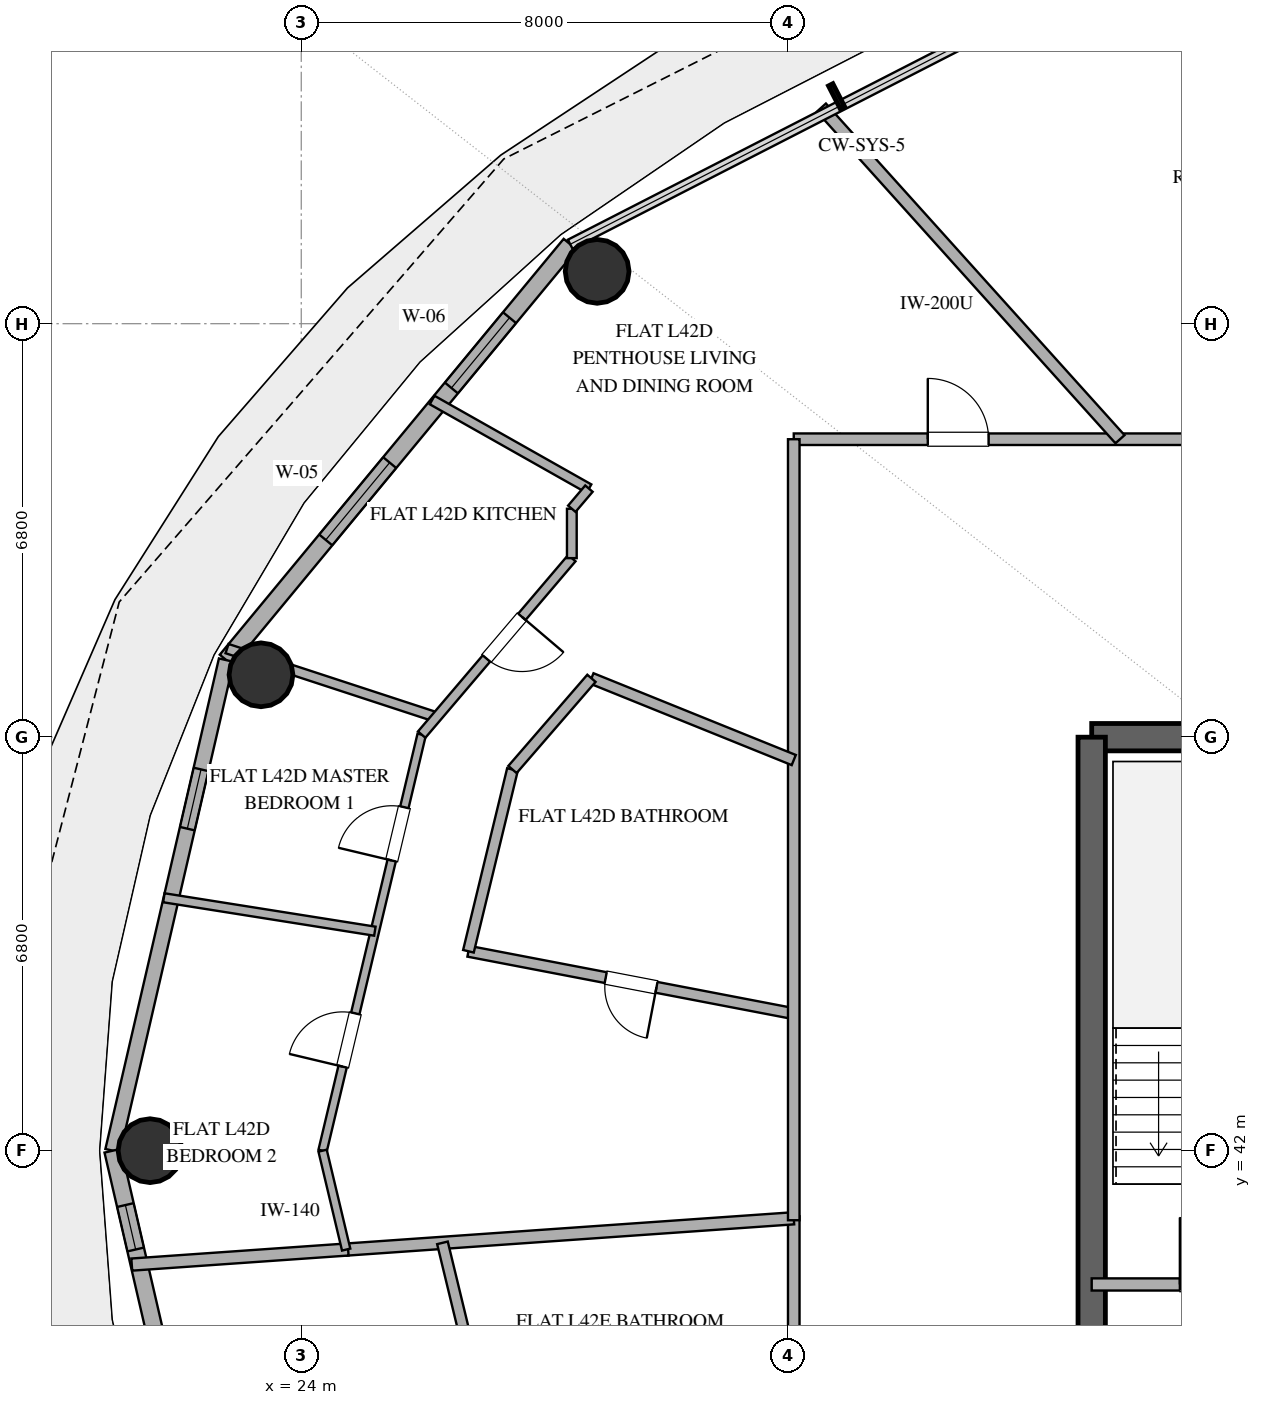
"""IFC4 building model, lengths in metres.
Left out: names, types, materials, properties, quantities, classifications, styles, units other than length and angle.
Written with IfcOpenShell. Run it as: python <this file> out.ifc"""

import sys

from ifc_helpers import new_model, si_unit, direction, frame, frame_2d, origin, origin_2d, place, context, subcontext, project, spatial, rectangle, hollow_circle, extrude, element, fill, save


model = new_model("IFC4")
c1 = context("Model", 3, precision=1e-05, world=origin(), true_north=direction((0.0, 1.0)))
c2 = subcontext(c1, "Body", "Model", "MODEL_VIEW")
j1 = project(units=[si_unit("LENGTHUNIT", "METRE"), si_unit("PLANEANGLEUNIT", "RADIAN")], contexts=[c1])
p1 = place(None, origin())
s1 = spatial("IfcSite", under=j1, at=p1, CompositionType="ELEMENT")
p2 = place(p1, origin())
s2 = spatial("IfcBuilding", under=s1, at=p2, CompositionType="ELEMENT")
p3 = place(p2, frame((0.0, 0.0, 168.6)))
s3 = spatial("IfcBuildingStorey", under=s2, at=p3, CompositionType="ELEMENT", Elevation=168.6)
p4 = place(p3, frame((37.0, 48.8, 0.0), z_axis=(0.0, 0.0, 1.0), x_axis=(1.0, 0.0, 0.0)))
e1 = element("IfcWall", 1, at=p4, inside=s3, PredefinedType="SHEAR", context=c2, shape_type="SweptSolid", body=[
    extrude(rectangle(XDim=4.0, YDim=0.45, at=frame_2d((2.0, 0.0))), origin(), (0.0, 0.0, 1.0), 3.38),
])
p5 = place(p3, frame((37.0, 35.2, 0.0), z_axis=(0.0, 0.0, 1.0), x_axis=(0.0, 1.0, 0.0)))
e2 = element("IfcWall", 2, at=p5, inside=s3, PredefinedType="SHEAR", context=c2, shape_type="SweptSolid", body=[
    extrude(rectangle(XDim=13.6, YDim=0.45, at=frame_2d((6.8, 0.0))), origin(), (0.0, 0.0, 1.0), 3.38),
])
for number, where, z_axis, x_axis in (
    (3, (28.866, 56.46, 0.0), (0.0, 0.0, 1.0), (1.0, 0.0, 0.0)),
    (4, (23.338, 49.826, 0.0), (0.0, 0.0, 1.0), (1.0, 0.0, 0.0)),
    (5, (21.513, 42.0, 0.0), (0.0, 0.0, 1.0), (1.0, 0.0, 0.0)),
):
    element("IfcColumn", number, at=place(p3, frame(where, z_axis=z_axis, x_axis=x_axis)), inside=s3, PredefinedType="COLUMN", context=c2, shape_type="SweptSolid", body=[
        extrude(hollow_circle(Radius=0.525, WallThickness=0.028, at=origin_2d()), origin(), (0.0, 0.0, 1.0), 3.38),
    ])
p6 = place(p3, frame((28.424, 56.906, 0.0), z_axis=(0.0, 0.0, 1.0), x_axis=(-0.637333477683, -0.770588111915, 0.0)))
e6 = element("IfcWall", 6, at=p6, inside=s3, PredefinedType="SOLIDWALL", context=c2, shape_type="SweptSolid", body=[
    extrude(rectangle(XDim=8.875, YDim=0.28, at=frame_2d((4.438, 0.0))), origin(), (0.0, 0.0, 1.0), 3.38),
])
p7 = place(p6, frame((1.566, 0.0, 0.85)))
e7 = element("IfcOpeningElement", 7, at=p7, cuts=e6, PredefinedType="OPENING", context=c2, shape_type="SweptSolid", body=[
    extrude(rectangle(XDim=1.5, YDim=2.0, at=frame_2d((0.75, 1.0))), frame((0.0, 0.15, 0.0), z_axis=(0.0, -1.0, 0.0), x_axis=(1.0, 0.0, 0.0)), (0.0, 0.0, 1.0), 0.3),
])
p8 = place(p6, frame((4.659, 0.0, 0.85)))
e8 = element("IfcOpeningElement", 8, at=p8, cuts=e6, PredefinedType="OPENING", context=c2, shape_type="SweptSolid", body=[
    extrude(rectangle(XDim=1.65, YDim=2.0, at=frame_2d((0.825, 1.0))), frame((0.0, 0.15, 0.0), z_axis=(0.0, -1.0, 0.0), x_axis=(1.0, 0.0, 0.0)), (0.0, 0.0, 1.0), 0.3),
])
p9 = place(p3, frame((22.768, 50.067, 0.0), z_axis=(0.0, 0.0, 1.0), x_axis=(-0.225473184558, -0.974249374157, 0.0)))
e9 = element("IfcWall", 9, at=p9, inside=s3, PredefinedType="SOLIDWALL", context=c2, shape_type="SweptSolid", body=[
    extrude(rectangle(XDim=8.28, YDim=0.25, at=frame_2d((4.14, 0.0))), origin(), (0.0, 0.0, 1.0), 3.38),
])
p10 = place(p9, frame((1.844, 0.0, 1.42)))
e10 = element("IfcOpeningElement", 10, at=p10, cuts=e9, PredefinedType="OPENING", context=c2, shape_type="SweptSolid", body=[
    extrude(rectangle(XDim=1.0, YDim=1.05, at=frame_2d((0.5, 0.525))), frame((0.0, 0.135, 0.0), z_axis=(0.0, -1.0, 0.0), x_axis=(1.0, 0.0, 0.0)), (0.0, 0.0, 1.0), 0.27),
])
p11 = place(p3, frame((20.901, 42.0, 0.0), z_axis=(0.0, 0.0, 1.0), x_axis=(0.225473184558, -0.974249374157, 0.0)))
e11 = element("IfcWall", 11, at=p11, inside=s3, PredefinedType="SOLIDWALL", context=c2, shape_type="SweptSolid", body=[
    extrude(rectangle(XDim=8.28, YDim=0.28, at=frame_2d((4.14, 0.0))), origin(), (0.0, 0.0, 1.0), 3.38),
])
p12 = place(p11, frame((5.144, 0.0, 0.0)))
e12 = element("IfcOpeningElement", 12, at=p12, cuts=e11, PredefinedType="OPENING", context=c2, shape_type="SweptSolid", body=[
    extrude(rectangle(XDim=1.6, YDim=2.25, at=frame_2d((0.8, 1.125))), frame((0.0, 0.15, 0.0), z_axis=(0.0, -1.0, 0.0), x_axis=(1.0, 0.0, 0.0)), (0.0, 0.0, 1.0), 0.3),
])
p13 = place(p11, frame((0.918, 0.0, 0.85)))
e13 = element("IfcOpeningElement", 13, at=p13, cuts=e11, PredefinedType="OPENING", context=c2, shape_type="SweptSolid", body=[
    extrude(rectangle(XDim=0.75, YDim=1.8, at=frame_2d((0.375, 0.9))), frame((0.0, 0.15, 0.0), z_axis=(0.0, -1.0, 0.0), x_axis=(1.0, 0.0, 0.0)), (0.0, 0.0, 1.0), 0.3),
])
p14 = place(p3, frame((37.0, 39.8, 0.0), z_axis=(0.0, 0.0, 1.0), x_axis=(1.0, 0.0, 0.0)))
e14 = element("IfcWall", 14, at=p14, inside=s3, PredefinedType="SOLIDWALL", context=c2, shape_type="SweptSolid", body=[
    extrude(rectangle(XDim=4.0, YDim=0.2, at=frame_2d((2.0, 0.0))), origin(), (0.0, 0.0, 1.0), 2.74),
])
p15 = place(p14, frame((1.45, 0.0, 0.0)))
e15 = element("IfcOpeningElement", 15, at=p15, cuts=e14, PredefinedType="OPENING", context=c2, shape_type="SweptSolid", body=[
    extrude(rectangle(XDim=1.1, YDim=2.15, at=frame_2d((0.55, 1.075))), frame((0.0, 0.11, 0.0), z_axis=(0.0, -1.0, 0.0), x_axis=(1.0, 0.0, 0.0)), (0.0, 0.0, 1.0), 0.22),
])
p16 = place(p3, frame((32.1, 53.7, 0.0), z_axis=(0.0, 0.0, 1.0), x_axis=(1.0, 0.0, 0.0)))
e16 = element("IfcWall", 16, at=p16, inside=s3, PredefinedType="PARTITIONING", context=c2, shape_type="SweptSolid", body=[
    extrude(rectangle(XDim=19.477, YDim=0.19, at=frame_2d((9.738, 0.0))), origin(), (0.0, 0.0, 1.0), 2.74),
])
p17 = place(p16, frame((9.923, 0.0, 0.0)))
e17 = element("IfcOpeningElement", 17, at=p17, cuts=e16, PredefinedType="OPENING", context=c2, shape_type="SweptSolid", body=[
    extrude(rectangle(XDim=1.0, YDim=2.2, at=frame_2d((0.5, 1.1))), frame((0.0, 0.105, 0.0), z_axis=(0.0, -1.0, 0.0), x_axis=(1.0, 0.0, 0.0)), (0.0, 0.0, 1.0), 0.21),
])
p18 = place(p16, frame((2.204, 0.0, 0.0)))
e18 = element("IfcOpeningElement", 18, at=p18, cuts=e16, PredefinedType="OPENING", context=c2, shape_type="SweptSolid", body=[
    extrude(rectangle(XDim=1.0, YDim=2.2, at=frame_2d((0.5, 1.1))), frame((0.0, 0.105, 0.0), z_axis=(0.0, -1.0, 0.0), x_axis=(1.0, 0.0, 0.0)), (0.0, 0.0, 1.0), 0.21),
])
p19 = place(p3, frame((32.1, 30.3, 0.0), z_axis=(0.0, 0.0, 1.0), x_axis=(0.0, 1.0, 0.0)))
e19 = element("IfcWall", 19, at=p19, inside=s3, PredefinedType="PARTITIONING", context=c2, shape_type="SweptSolid", body=[
    extrude(rectangle(XDim=10.62, YDim=0.19, at=frame_2d((5.31, 0.0))), origin(), (0.0, 0.0, 1.0), 2.74),
])
p20 = place(p19, frame((3.475, 0.0, 0.0)))
e20 = element("IfcOpeningElement", 20, at=p20, cuts=e19, PredefinedType="OPENING", context=c2, shape_type="SweptSolid", body=[
    extrude(rectangle(XDim=1.0, YDim=2.2, at=frame_2d((0.5, 1.1))), frame((0.0, 0.105, 0.0), z_axis=(0.0, -1.0, 0.0), x_axis=(1.0, 0.0, 0.0)), (0.0, 0.0, 1.0), 0.21),
])
p21 = place(p3, frame((37.465, 53.7, 0.0), z_axis=(0.0, 0.0, 1.0), x_axis=(-0.669128292476, 0.7431469089, 0.0)))
e21 = element("IfcWall", 21, at=p21, inside=s3, PredefinedType="PARTITIONING", context=c2, shape_type="SweptSolid", body=[
    extrude(rectangle(XDim=7.339, YDim=0.2, at=frame_2d((3.669, 0.0))), origin(), (0.0, 0.0, 1.0), 2.74),
])
p22 = place(p3, frame((32.1, 40.888, 0.0), z_axis=(0.0, 0.0, 1.0), x_axis=(-0.997562906323, -0.069772830877, 0.0)))
e22 = element("IfcWall", 22, at=p22, inside=s3, PredefinedType="PARTITIONING", context=c2, shape_type="SweptSolid", body=[
    extrude(rectangle(XDim=7.38, YDim=0.2, at=frame_2d((3.69, 0.0))), origin(), (0.0, 0.0, 1.0), 2.74),
])
p23 = place(p3, frame((32.1, 44.253, 0.0), z_axis=(0.0, 0.0, 1.0), x_axis=(-0.982102846986, 0.188345421878, 0.0)))
e23 = element("IfcWall", 23, at=p23, inside=s3, PredefinedType="PLUMBINGWALL", context=c2, shape_type="SweptSolid", body=[
    extrude(rectangle(XDim=5.448, YDim=0.18, at=frame_2d((2.724, 0.0))), origin(), (0.0, 0.0, 1.0), 2.74),
])
p24 = place(p23, frame((2.299, 0.0, 0.0)))
e24 = element("IfcOpeningElement", 24, at=p24, cuts=e23, PredefinedType="OPENING", context=c2, shape_type="SweptSolid", body=[
    extrude(rectangle(XDim=0.85, YDim=2.1, at=frame_2d((0.425, 1.05))), frame((0.0, 0.1, 0.0), z_axis=(0.0, -1.0, 0.0), x_axis=(1.0, 0.0, 0.0)), (0.0, 0.0, 1.0), 0.2),
])
p25 = place(p3, frame((32.1, 40.856, 0.0), z_axis=(0.0, 0.0, 1.0), x_axis=(0.0, 1.0, 0.0)))
e25 = element("IfcWall", 25, at=p25, inside=s3, PredefinedType="PARTITIONING", context=c2, shape_type="SweptSolid", body=[
    extrude(rectangle(XDim=12.844, YDim=0.19, at=frame_2d((6.422, 0.0))), origin(), (0.0, 0.0, 1.0), 2.74),
])
p26 = place(p3, frame((26.322, 40.484, 0.0), z_axis=(0.0, 0.0, 1.0), x_axis=(0.235484788327, -0.971878034769, 0.0)))
e26 = element("IfcWall", 26, at=p26, inside=s3, PredefinedType="PLUMBINGWALL", context=c2, shape_type="SweptSolid", body=[
    extrude(rectangle(XDim=4.73, YDim=0.18, at=frame_2d((2.365, 0.0))), origin(), (0.0, 0.0, 1.0), 2.74),
])
p27 = place(p3, frame((24.351, 42.0, 0.0), z_axis=(0.0, 0.0, 1.0), x_axis=(0.231625219966, 0.972805097373, 0.0)))
e27 = element("IfcWall", 27, at=p27, inside=s3, PredefinedType="PARTITIONING", context=c2, shape_type="SweptSolid", body=[
    extrude(rectangle(XDim=7.033, YDim=0.14, at=frame_2d((3.517, 0.0))), origin(), (0.0, 0.0, 1.0), 2.74),
])
p28 = place(p27, frame((1.421, 0.0, 0.0)))
e28 = element("IfcOpeningElement", 28, at=p28, cuts=e27, PredefinedType="OPENING", context=c2, shape_type="SweptSolid", body=[
    extrude(rectangle(XDim=0.9, YDim=2.1, at=frame_2d((0.45, 1.05))), frame((0.0, 0.08, 0.0), z_axis=(0.0, -1.0, 0.0), x_axis=(1.0, 0.0, 0.0)), (0.0, 0.0, 1.0), 0.16),
])
p29 = place(p27, frame((4.906, 0.0, 0.0)))
e29 = element("IfcOpeningElement", 29, at=p29, cuts=e27, PredefinedType="OPENING", context=c2, shape_type="SweptSolid", body=[
    extrude(rectangle(XDim=0.9, YDim=2.1, at=frame_2d((0.45, 1.05))), frame((0.0, 0.08, 0.0), z_axis=(0.0, -1.0, 0.0), x_axis=(1.0, 0.0, 0.0)), (0.0, 0.0, 1.0), 0.16),
])
p30 = place(p3, frame((22.78, 50.257, 0.0), z_axis=(0.0, 0.0, 1.0), x_axis=(0.95036707557, -0.311130875474, 0.0)))
e30 = element("IfcWall", 30, at=p30, inside=s3, PredefinedType="PLUMBINGWALL", context=c2, shape_type="SweptSolid", body=[
    extrude(rectangle(XDim=3.625, YDim=0.16, at=frame_2d((1.812, 0.0))), origin(), (0.0, 0.0, 1.0), 2.74),
])
p31 = place(p3, frame((28.773, 49.768, 0.0), z_axis=(0.0, 0.0, 1.0), x_axis=(0.927195040954, -0.374578904945, 0.0)))
e31 = element("IfcWall", 31, at=p31, inside=s3, PredefinedType="PLUMBINGWALL", context=c2, shape_type="SweptSolid", body=[
    extrude(rectangle(XDim=3.589, YDim=0.18, at=frame_2d((1.794, 0.0))), origin(), (0.0, 0.0, 1.0), 2.74),
])
p32 = place(p3, frame((21.212, 40.127, 0.0), z_axis=(0.0, 0.0, 1.0), x_axis=(0.997565256009, 0.069739228586, 0.0)))
e32 = element("IfcWall", 32, at=p32, inside=s3, PredefinedType="PARTITIONING", context=c2, shape_type="SweptSolid", body=[
    extrude(rectangle(XDim=3.567, YDim=0.2, at=frame_2d((1.784, 0.0))), origin(), (0.0, 0.0, 1.0), 2.74),
])
p33 = place(p3, frame((25.211, 45.61, 0.0), z_axis=(0.0, 0.0, 1.0), x_axis=(-0.987691308322, 0.156415726399, 0.0)))
e33 = element("IfcWall", 33, at=p33, inside=s3, PredefinedType="PARTITIONING", context=c2, shape_type="SweptSolid", body=[
    extrude(rectangle(XDim=3.513, YDim=0.15, at=frame_2d((1.757, 0.0))), origin(), (0.0, 0.0, 1.0), 2.74),
])
p34 = place(p3, frame((28.45, 51.744, 0.0), z_axis=(0.0, 0.0, 1.0), x_axis=(-0.648022171798, -0.761621470849, 0.0)))
e34 = element("IfcWall", 34, at=p34, inside=s3, PredefinedType="PLUMBINGWALL", context=c2, shape_type="SweptSolid", body=[
    extrude(rectangle(XDim=3.81, YDim=0.16, at=frame_2d((1.905, 0.0))), origin(), (0.0, 0.0, 1.0), 2.74),
])
p35 = place(p34, frame((1.267, 0.0, 0.0)))
e35 = element("IfcOpeningElement", 35, at=p35, cuts=e34, PredefinedType="OPENING", context=c2, shape_type="SweptSolid", body=[
    extrude(rectangle(XDim=0.9, YDim=2.1, at=frame_2d((0.45, 1.05))), frame((0.0, 0.09, 0.0), z_axis=(0.0, -1.0, 0.0), x_axis=(1.0, 0.0, 0.0)), (0.0, 0.0, 1.0), 0.18),
])
p36 = place(p3, frame((26.75, 45.279, 0.0), z_axis=(0.0, 0.0, 1.0), x_axis=(0.235525049635, 0.971868278624, 0.0)))
e36 = element("IfcWall", 36, at=p36, inside=s3, PredefinedType="PLUMBINGWALL", context=c2, shape_type="SweptSolid", body=[
    extrude(rectangle(XDim=3.075, YDim=0.18, at=frame_2d((1.538, 0.0))), origin(), (0.0, 0.0, 1.0), 2.74),
])
p37 = place(p3, frame((26.152, 54.345, 0.0), z_axis=(0.0, 0.0, 1.0), x_axis=(0.870631902874, -0.491935046219, 0.0)))
e37 = element("IfcWall", 37, at=p37, inside=s3, PredefinedType="PLUMBINGWALL", context=c2, shape_type="SweptSolid", body=[
    extrude(rectangle(XDim=2.962, YDim=0.16, at=frame_2d((1.481, 0.0))), origin(), (0.0, 0.0, 1.0), 2.74),
])
p38 = place(p3, frame((27.474, 48.268, 0.0), z_axis=(0.0, 0.0, 1.0), x_axis=(0.654593195673, 0.755981314702, 0.0)))
e38 = element("IfcWall", 38, at=p38, inside=s3, PredefinedType="PLUMBINGWALL", context=c2, shape_type="SweptSolid", body=[
    extrude(rectangle(XDim=1.984, YDim=0.18, at=frame_2d((0.992, 0.0))), origin(), (0.0, 0.0, 1.0), 2.74),
])
p39 = place(p3, frame((24.739, 40.373, 0.0), z_axis=(0.0, 0.0, 1.0), x_axis=(-0.231561310927, 0.972820311919, 0.0)))
e39 = element("IfcWall", 39, at=p39, inside=s3, PredefinedType="PARTITIONING", context=c2, shape_type="SweptSolid", body=[
    extrude(rectangle(XDim=1.672, YDim=0.14, at=frame_2d((0.836, 0.0))), origin(), (0.0, 0.0, 1.0), 2.74),
])
p40 = place(p3, frame((28.45, 52.557, 0.0), z_axis=(0.0, 0.0, 1.0), x_axis=(0.0, -1.0, 0.0)))
e40 = element("IfcWall", 40, at=p40, inside=s3, PredefinedType="PLUMBINGWALL", context=c2, shape_type="SweptSolid", body=[
    extrude(rectangle(XDim=0.812, YDim=0.16, at=frame_2d((0.406, 0.0))), origin(), (0.0, 0.0, 1.0), 2.74),
])
p41 = place(p3, frame((28.731, 52.887, 0.0), z_axis=(0.0, 0.0, 1.0), x_axis=(-0.648056208932, -0.761592509196, 0.0)))
e41 = element("IfcWall", 41, at=p41, inside=s3, PredefinedType="PLUMBINGWALL", context=c2, shape_type="SweptSolid", body=[
    extrude(rectangle(XDim=0.434, YDim=0.16, at=frame_2d((0.217, 0.0))), origin(), (0.0, 0.0, 1.0), 2.74),
])
p42 = place(p7, origin())
e42 = element("IfcWindow", 42, at=p42, inside=s3, PartitioningType="SINGLE_PANEL", PredefinedType="WINDOW", context=c2, shape_type="SweptSolid", body=[
    extrude(rectangle(XDim=1.5, YDim=2.0, at=frame_2d((0.75, 1.0))), frame((0.0, 0.03, 0.0), z_axis=(0.0, -1.0, 0.0), x_axis=(1.0, 0.0, 0.0)), (0.0, 0.0, 1.0), 0.06),
])
fill(e7, e42)
p43 = place(p8, origin())
e43 = element("IfcWindow", 43, at=p43, inside=s3, PartitioningType="SINGLE_PANEL", PredefinedType="WINDOW", context=c2, shape_type="SweptSolid", body=[
    extrude(rectangle(XDim=1.65, YDim=2.0, at=frame_2d((0.825, 1.0))), frame((0.0, 0.03, 0.0), z_axis=(0.0, -1.0, 0.0), x_axis=(1.0, 0.0, 0.0)), (0.0, 0.0, 1.0), 0.06),
])
fill(e8, e43)
p44 = place(p10, origin())
e44 = element("IfcWindow", 44, at=p44, inside=s3, PartitioningType="SINGLE_PANEL", PredefinedType="WINDOW", context=c2, shape_type="SweptSolid", body=[
    extrude(rectangle(XDim=1.0, YDim=1.05, at=frame_2d((0.5, 0.525))), frame((0.0, 0.03, 0.0), z_axis=(0.0, -1.0, 0.0), x_axis=(1.0, 0.0, 0.0)), (0.0, 0.0, 1.0), 0.06),
])
fill(e10, e44)
p45 = place(p13, origin())
e45 = element("IfcWindow", 45, at=p45, inside=s3, PartitioningType="SINGLE_PANEL", PredefinedType="WINDOW", context=c2, shape_type="SweptSolid", body=[
    extrude(rectangle(XDim=0.75, YDim=1.8, at=frame_2d((0.375, 0.9))), frame((0.0, 0.03, 0.0), z_axis=(0.0, -1.0, 0.0), x_axis=(1.0, 0.0, 0.0)), (0.0, 0.0, 1.0), 0.06),
])
fill(e13, e45)
p46 = place(p15, origin())
e46 = element("IfcDoor", 46, at=p46, inside=s3, OperationType="SINGLE_SWING_LEFT", PredefinedType="DOOR", context=c2, shape_type="SweptSolid", body=[
    extrude(rectangle(XDim=1.1, YDim=2.15, at=frame_2d((0.55, 1.075))), frame((0.0, 0.025, 0.0), z_axis=(0.0, -1.0, 0.0), x_axis=(1.0, 0.0, 0.0)), (0.0, 0.0, 1.0), 0.05),
])
fill(e15, e46)
p47 = place(p18, origin())
e47 = element("IfcDoor", 47, at=p47, inside=s3, OperationType="SINGLE_SWING_LEFT", PredefinedType="DOOR", context=c2, shape_type="SweptSolid", body=[
    extrude(rectangle(XDim=1.0, YDim=2.2, at=frame_2d((0.5, 1.1))), frame((0.0, 0.025, 0.0), z_axis=(0.0, -1.0, 0.0), x_axis=(1.0, 0.0, 0.0)), (0.0, 0.0, 1.0), 0.05),
])
fill(e18, e47)
p48 = place(p24, origin())
e48 = element("IfcDoor", 48, at=p48, inside=s3, OperationType="SINGLE_SWING_LEFT", PredefinedType="DOOR", context=c2, shape_type="SweptSolid", body=[
    extrude(rectangle(XDim=0.85, YDim=2.1, at=frame_2d((0.425, 1.05))), frame((0.0, 0.025, 0.0), z_axis=(0.0, -1.0, 0.0), x_axis=(1.0, 0.0, 0.0)), (0.0, 0.0, 1.0), 0.05),
])
fill(e24, e48)
p49 = place(p28, origin())
e49 = element("IfcDoor", 49, at=p49, inside=s3, OperationType="SINGLE_SWING_LEFT", PredefinedType="DOOR", context=c2, shape_type="SweptSolid", body=[
    extrude(rectangle(XDim=0.9, YDim=2.1, at=frame_2d((0.45, 1.05))), frame((0.0, 0.025, 0.0), z_axis=(0.0, -1.0, 0.0), x_axis=(1.0, 0.0, 0.0)), (0.0, 0.0, 1.0), 0.05),
])
fill(e28, e49)
p50 = place(p29, origin())
e50 = element("IfcDoor", 50, at=p50, inside=s3, OperationType="SINGLE_SWING_LEFT", PredefinedType="DOOR", context=c2, shape_type="SweptSolid", body=[
    extrude(rectangle(XDim=0.9, YDim=2.1, at=frame_2d((0.45, 1.05))), frame((0.0, 0.025, 0.0), z_axis=(0.0, -1.0, 0.0), x_axis=(1.0, 0.0, 0.0)), (0.0, 0.0, 1.0), 0.05),
])
fill(e29, e50)
p51 = place(p35, origin())
e51 = element("IfcDoor", 51, at=p51, inside=s3, OperationType="SINGLE_SWING_LEFT", PredefinedType="DOOR", context=c2, shape_type="SweptSolid", body=[
    extrude(rectangle(XDim=0.9, YDim=2.1, at=frame_2d((0.45, 1.05))), frame((0.0, 0.025, 0.0), z_axis=(0.0, -1.0, 0.0), x_axis=(1.0, 0.0, 0.0)), (0.0, 0.0, 1.0), 0.05),
])
fill(e35, e51)
save(model, sys.argv[1])
